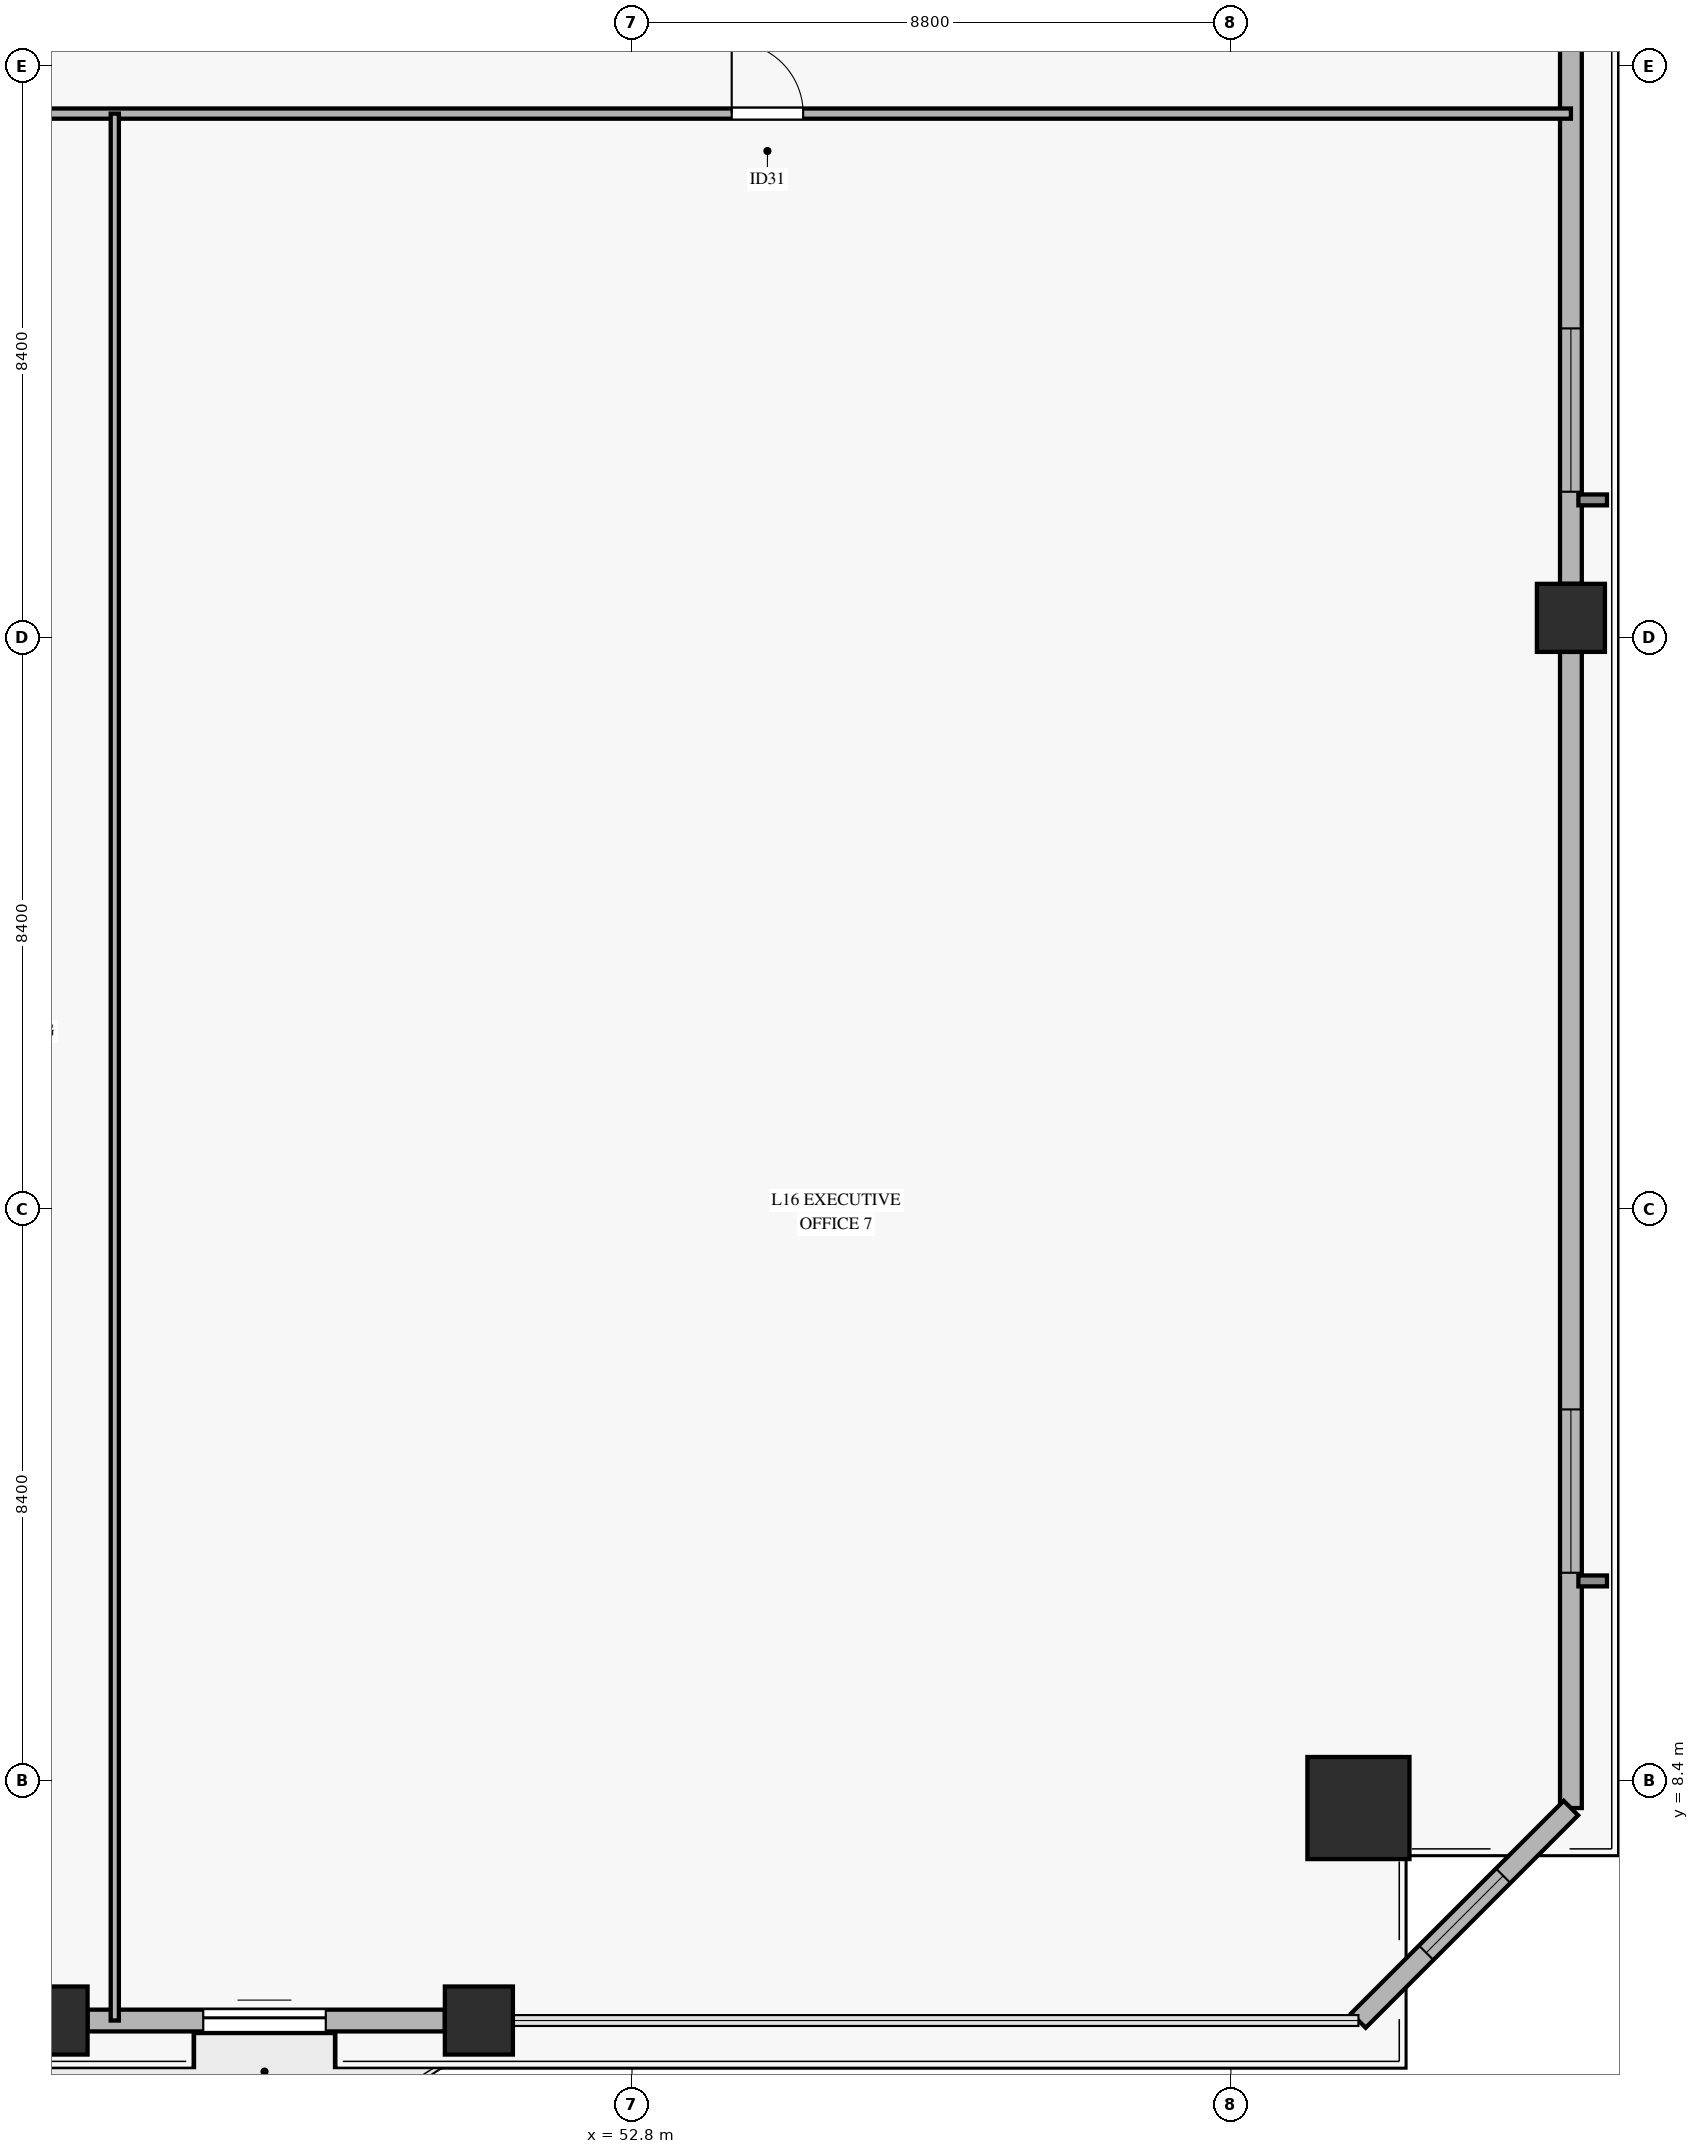
"""IFC4 building model, lengths in metres.
Left out: names, types, materials, properties, quantities, classifications, styles, units other than length and angle.
Written with IfcOpenShell. Run it as: python <this file> out.ifc"""

import sys

from ifc_helpers import new_model, si_unit, direction, frame, frame_2d, origin, origin_2d, place, context, subcontext, project, spatial, rectangle, hollow_rectangle, extrude, source, transform, mapped, element, fill, save


model = new_model("IFC4")
c1 = context("Model", 3, precision=1e-05, world=origin(), true_north=direction((0.0, 1.0)))
c2 = subcontext(c1, "Body", "Model", "MODEL_VIEW")
j1 = project(units=[si_unit("LENGTHUNIT", "METRE"), si_unit("PLANEANGLEUNIT", "RADIAN")], contexts=[c1])
p1 = place(None, origin())
s1 = spatial("IfcSite", under=j1, at=p1, CompositionType="ELEMENT")
p2 = place(p1, origin())
s2 = spatial("IfcBuilding", under=s1, at=p2, CompositionType="ELEMENT")
p3 = place(p2, frame((0.0, 0.0, 65.0)))
s3 = spatial("IfcBuildingStorey", under=s2, at=p3, CompositionType="ELEMENT", Elevation=65.0)
m1 = source(origin(), c2, "Body", "SweptSolid", [
    extrude(hollow_rectangle(XDim=1.5, YDim=1.5, WallThickness=0.07, at=origin_2d()), origin(), (0.0, 0.0, 1.0), 3.68),
])
p4 = place(p3, frame((63.474, 8.004, 0.0), z_axis=(0.0, 0.0, 1.0), x_axis=(1.0, 0.0, 0.0)))
e1 = element("IfcColumn", 1, at=p4, inside=s3, PredefinedType="COLUMN", context=c2, shape_type="MappedRepresentation", body=[
    mapped(m1, transform((0.0, 0.0, 0.0), x_axis=(1.0, 0.0, 0.0), y_axis=(0.0, 1.0, 0.0), z_axis=(0.0, 0.0, 1.0), scale=1.0)),
])
m2 = source(origin(), c2, "Body", "SweptSolid", [
    extrude(hollow_rectangle(XDim=1.0, YDim=1.0, WallThickness=0.045, at=origin_2d()), origin(), (0.0, 0.0, 1.0), 3.68),
])
for number, where, z_axis, x_axis in (
    (2, (44.3, 4.882, 0.0), (0.0, 0.0, 1.0), (1.0, 0.0, 0.0)),
    (3, (50.55, 4.882, 0.0), (0.0, 0.0, 1.0), (1.0, 0.0, 0.0)),
    (4, (66.596, 25.491, 0.0), (0.0, 0.0, 1.0), (1.0, 0.0, 0.0)),
):
    element("IfcColumn", number, at=place(p3, frame(where, z_axis=z_axis, x_axis=x_axis)), inside=s3, PredefinedType="COLUMN", context=c2, shape_type="MappedRepresentation", body=[
        mapped(m2, transform((0.0, 0.0, 0.0), x_axis=(1.0, 0.0, 0.0), y_axis=(0.0, 1.0, 0.0), z_axis=(0.0, 0.0, 1.0), scale=1.0)),
    ])
p5 = place(p3, frame((44.8, 4.882, 0.0), z_axis=(0.0, 0.0, 1.0), x_axis=(1.0, 0.0, 0.0)))
e5 = element("IfcWall", 5, at=p5, inside=s3, PredefinedType="SOLIDWALL", context=c2, shape_type="SweptSolid", body=[
    extrude(rectangle(XDim=5.25, YDim=0.32, at=frame_2d((2.625, 0.0))), origin(), (0.0, 0.0, 1.0), 3.16),
])
p6 = place(p5, frame((1.7, 0.0, 0.0)))
e6 = element("IfcOpeningElement", 6, at=p6, cuts=e5, PredefinedType="OPENING", context=c2, shape_type="SweptSolid", body=[
    extrude(rectangle(XDim=1.8, YDim=2.25, at=frame_2d((0.9, 1.125))), frame((0.0, 0.17, 0.0), z_axis=(0.0, -1.0, 0.0), x_axis=(1.0, 0.0, 0.0)), (0.0, 0.0, 1.0), 0.34),
])
p7 = place(p3, frame((66.596, 8.004, 0.0), z_axis=(0.0, 0.0, 1.0), x_axis=(0.0, 1.0, 0.0)))
e7 = element("IfcWall", 7, at=p7, inside=s3, PredefinedType="SOLIDWALL", context=c2, shape_type="SweptSolid", body=[
    extrude(rectangle(XDim=16.987, YDim=0.32, at=frame_2d((8.494, 0.0))), origin(), (0.0, 0.0, 1.0), 3.16),
])
p8 = place(p7, frame((3.457, 0.0, 0.45)))
e8 = element("IfcOpeningElement", 8, at=p8, cuts=e7, PredefinedType="OPENING", context=c2, shape_type="SweptSolid", body=[
    extrude(rectangle(XDim=2.4, YDim=2.1, at=frame_2d((1.2, 1.05))), frame((0.0, 0.17, 0.0), z_axis=(0.0, -1.0, 0.0), x_axis=(1.0, 0.0, 0.0)), (0.0, 0.0, 1.0), 0.34),
])
p9 = place(p3, frame((66.596, 25.991, 0.0), z_axis=(0.0, 0.0, 1.0), x_axis=(0.0, 1.0, 0.0)))
e9 = element("IfcWall", 9, at=p9, inside=s3, PredefinedType="SOLIDWALL", context=c2, shape_type="SweptSolid", body=[
    extrude(rectangle(XDim=16.987, YDim=0.32, at=frame_2d((8.494, 0.0))), origin(), (0.0, 0.0, 1.0), 3.16),
])
p10 = place(p9, frame((1.353, 0.0, 0.45)))
e10 = element("IfcOpeningElement", 10, at=p10, cuts=e9, PredefinedType="OPENING", context=c2, shape_type="SweptSolid", body=[
    extrude(rectangle(XDim=2.4, YDim=2.1, at=frame_2d((1.2, 1.05))), frame((0.0, 0.17, 0.0), z_axis=(0.0, -1.0, 0.0), x_axis=(1.0, 0.0, 0.0)), (0.0, 0.0, 1.0), 0.34),
])
p11 = place(p9, frame((13.117, 0.0, 0.45)))
e11 = element("IfcOpeningElement", 11, at=p11, cuts=e9, PredefinedType="OPENING", context=c2, shape_type="SweptSolid", body=[
    extrude(rectangle(XDim=2.4, YDim=2.1, at=frame_2d((1.2, 1.05))), frame((0.0, 0.17, 0.0), z_axis=(0.0, -1.0, 0.0), x_axis=(1.0, 0.0, 0.0)), (0.0, 0.0, 1.0), 0.34),
])
p12 = place(p3, frame((63.474, 4.882, 0.0), z_axis=(0.0, 0.0, 1.0), x_axis=(0.707106781187, 0.707106781187, 0.0)))
e12 = element("IfcWall", 12, at=p12, inside=s3, PredefinedType="SOLIDWALL", context=c2, shape_type="SweptSolid", body=[
    extrude(rectangle(XDim=4.415, YDim=0.3, at=frame_2d((2.208, 0.0))), origin(), (0.0, 0.0, 1.0), 3.16),
])
p13 = place(p12, frame((1.408, 0.0, 0.45)))
e13 = element("IfcOpeningElement", 13, at=p13, cuts=e12, PredefinedType="OPENING", context=c2, shape_type="SweptSolid", body=[
    extrude(rectangle(XDim=1.6, YDim=2.0, at=frame_2d((0.8, 1.0))), frame((0.0, 0.16, 0.0), z_axis=(0.0, -1.0, 0.0), x_axis=(1.0, 0.0, 0.0)), (0.0, 0.0, 1.0), 0.32),
])
p14 = place(p3, frame((3.805, 32.9, 0.0), z_axis=(0.0, 0.0, 1.0), x_axis=(1.0, 0.0, 0.0)))
e14 = element("IfcWall", 14, at=p14, inside=s3, PredefinedType="PARTITIONING", context=c2, shape_type="SweptSolid", body=[
    extrude(rectangle(XDim=62.791, YDim=0.15, at=frame_2d((31.396, 0.0))), origin(), (0.0, 0.0, 1.0), 2.765),
])
p15 = place(p14, frame((7.669, 0.0, 0.0)))
e15 = element("IfcOpeningElement", 15, at=p15, cuts=e14, PredefinedType="OPENING", context=c2, shape_type="SweptSolid", body=[
    extrude(rectangle(XDim=1.05, YDim=2.15, at=frame_2d((0.525, 1.075))), frame((0.0, 0.085, 0.0), z_axis=(0.0, -1.0, 0.0), x_axis=(1.0, 0.0, 0.0)), (0.0, 0.0, 1.0), 0.17),
])
p16 = place(p14, frame((20.278, 0.0, 0.0)))
e16 = element("IfcOpeningElement", 16, at=p16, cuts=e14, PredefinedType="OPENING", context=c2, shape_type="SweptSolid", body=[
    extrude(rectangle(XDim=1.05, YDim=2.15, at=frame_2d((0.525, 1.075))), frame((0.0, 0.085, 0.0), z_axis=(0.0, -1.0, 0.0), x_axis=(1.0, 0.0, 0.0)), (0.0, 0.0, 1.0), 0.17),
])
p17 = place(p14, frame((25.606, 0.0, 0.0)))
e17 = element("IfcOpeningElement", 17, at=p17, cuts=e14, PredefinedType="OPENING", context=c2, shape_type="SweptSolid", body=[
    extrude(rectangle(XDim=1.05, YDim=2.15, at=frame_2d((0.525, 1.075))), frame((0.0, 0.085, 0.0), z_axis=(0.0, -1.0, 0.0), x_axis=(1.0, 0.0, 0.0)), (0.0, 0.0, 1.0), 0.17),
])
p18 = place(p14, frame((30.006, 0.0, 0.0)))
e18 = element("IfcOpeningElement", 18, at=p18, cuts=e14, PredefinedType="OPENING", context=c2, shape_type="SweptSolid", body=[
    extrude(rectangle(XDim=1.05, YDim=2.15, at=frame_2d((0.525, 1.075))), frame((0.0, 0.085, 0.0), z_axis=(0.0, -1.0, 0.0), x_axis=(1.0, 0.0, 0.0)), (0.0, 0.0, 1.0), 0.17),
])
p19 = place(p14, frame((34.406, 0.0, 0.0)))
e19 = element("IfcOpeningElement", 19, at=p19, cuts=e14, PredefinedType="OPENING", context=c2, shape_type="SweptSolid", body=[
    extrude(rectangle(XDim=1.05, YDim=2.15, at=frame_2d((0.525, 1.075))), frame((0.0, 0.085, 0.0), z_axis=(0.0, -1.0, 0.0), x_axis=(1.0, 0.0, 0.0)), (0.0, 0.0, 1.0), 0.17),
])
p20 = place(p14, frame((38.89, 0.0, 0.0)))
e20 = element("IfcOpeningElement", 20, at=p20, cuts=e14, PredefinedType="OPENING", context=c2, shape_type="SweptSolid", body=[
    extrude(rectangle(XDim=1.05, YDim=2.15, at=frame_2d((0.525, 1.075))), frame((0.0, 0.085, 0.0), z_axis=(0.0, -1.0, 0.0), x_axis=(1.0, 0.0, 0.0)), (0.0, 0.0, 1.0), 0.17),
])
p21 = place(p14, frame((50.46, 0.0, 0.0)))
e21 = element("IfcOpeningElement", 21, at=p21, cuts=e14, PredefinedType="OPENING", context=c2, shape_type="SweptSolid", body=[
    extrude(rectangle(XDim=1.05, YDim=2.15, at=frame_2d((0.525, 1.075))), frame((0.0, 0.085, 0.0), z_axis=(0.0, -1.0, 0.0), x_axis=(1.0, 0.0, 0.0)), (0.0, 0.0, 1.0), 0.17),
])
p22 = place(p3, frame((45.2, 4.882, 0.0), z_axis=(0.0, 0.0, 1.0), x_axis=(0.0, 1.0, 0.0)))
e22 = element("IfcWall", 22, at=p22, inside=s3, PredefinedType="PARTITIONING", context=c2, shape_type="SweptSolid", body=[
    extrude(rectangle(XDim=28.018, YDim=0.12, at=frame_2d((14.009, 0.0))), origin(), (0.0, 0.0, 1.0), 3.165),
])
m3 = source(origin(), c2, "Body", "SweptSolid", [
    extrude(rectangle(XDim=1.8, YDim=2.25, at=frame_2d((0.9, 1.125))), frame((0.0, 0.025, 0.0), z_axis=(0.0, -1.0, 0.0), x_axis=(1.0, 0.0, 0.0)), (0.0, 0.0, 1.0), 0.05),
])
p23 = place(p6, origin())
e23 = element("IfcDoor", 23, at=p23, inside=s3, OperationType="SLIDING_TO_LEFT", PredefinedType="DOOR", context=c2, shape_type="MappedRepresentation", body=[
    mapped(m3, transform((0.0, 0.0, 0.0), x_axis=(1.0, 0.0, 0.0), y_axis=(0.0, 1.0, 0.0), z_axis=(0.0, 0.0, 1.0), scale=1.0)),
])
fill(e6, e23)
m4 = source(origin(), c2, "Body", "SweptSolid", [
    extrude(rectangle(XDim=2.4, YDim=2.1, at=frame_2d((1.2, 1.05))), frame((0.0, 0.03, 0.0), z_axis=(0.0, -1.0, 0.0), x_axis=(1.0, 0.0, 0.0)), (0.0, 0.0, 1.0), 0.06),
])
p24 = place(p8, origin())
e24 = element("IfcWindow", 24, at=p24, inside=s3, PartitioningType="SINGLE_PANEL", PredefinedType="WINDOW", context=c2, shape_type="MappedRepresentation", body=[
    mapped(m4, transform((0.0, 0.0, 0.0), x_axis=(1.0, 0.0, 0.0), y_axis=(0.0, 1.0, 0.0), z_axis=(0.0, 0.0, 1.0), scale=1.0)),
])
fill(e8, e24)
p25 = place(p10, origin())
e25 = element("IfcWindow", 25, at=p25, inside=s3, PartitioningType="SINGLE_PANEL", PredefinedType="WINDOW", context=c2, shape_type="MappedRepresentation", body=[
    mapped(m4, transform((0.0, 0.0, 0.0), x_axis=(1.0, 0.0, 0.0), y_axis=(0.0, 1.0, 0.0), z_axis=(0.0, 0.0, 1.0), scale=1.0)),
])
fill(e10, e25)
m5 = source(origin(), c2, "Body", "SweptSolid", [
    extrude(rectangle(XDim=1.6, YDim=2.0, at=frame_2d((0.8, 1.0))), frame((0.0, 0.03, 0.0), z_axis=(0.0, -1.0, 0.0), x_axis=(1.0, 0.0, 0.0)), (0.0, 0.0, 1.0), 0.06),
])
p26 = place(p13, origin())
e26 = element("IfcWindow", 26, at=p26, inside=s3, PartitioningType="SINGLE_PANEL", PredefinedType="WINDOW", context=c2, shape_type="MappedRepresentation", body=[
    mapped(m5, transform((0.0, 0.0, 0.0), x_axis=(1.0, 0.0, 0.0), y_axis=(0.0, 1.0, 0.0), z_axis=(0.0, 0.0, 1.0), scale=1.0)),
])
fill(e13, e26)
m6 = source(origin(), c2, "Body", "SweptSolid", [
    extrude(rectangle(XDim=1.05, YDim=2.15, at=frame_2d((0.525, 1.075))), frame((0.0, 0.025, 0.0), z_axis=(0.0, -1.0, 0.0), x_axis=(1.0, 0.0, 0.0)), (0.0, 0.0, 1.0), 0.05),
])
p27 = place(p21, origin())
e27 = element("IfcDoor", 27, at=p27, inside=s3, OperationType="SINGLE_SWING_LEFT", PredefinedType="DOOR", context=c2, shape_type="MappedRepresentation", body=[
    mapped(m6, transform((0.0, 0.0, 0.0), x_axis=(1.0, 0.0, 0.0), y_axis=(0.0, 1.0, 0.0), z_axis=(0.0, 0.0, 1.0), scale=1.0)),
])
fill(e21, e27)
save(model, sys.argv[1])
